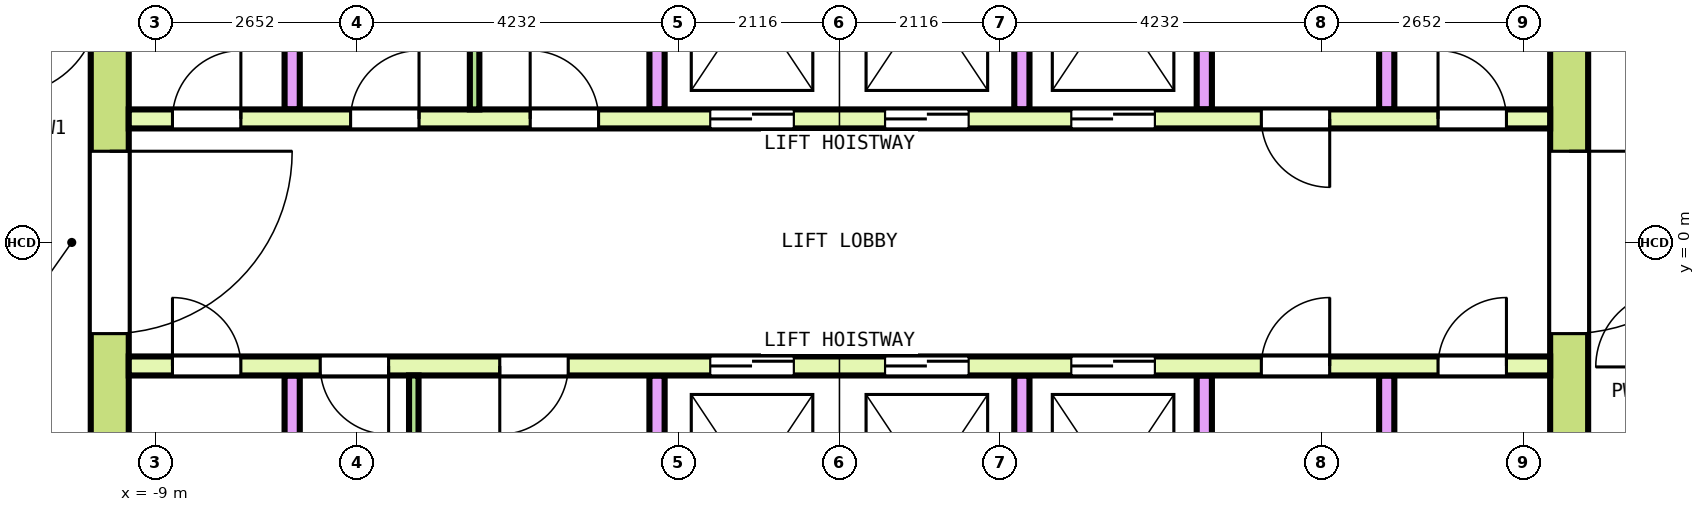
"""IFC4 building model, lengths in metres.
Left out: names, types, materials, properties, quantities, classifications, styles, units other than length and angle.
Written with IfcOpenShell. Run it as: python <this file> out.ifc"""

import sys

from ifc_helpers import new_model, si_unit, direction, frame, frame_2d, origin, place, context, subcontext, project, spatial, rectangle, extrude, element, fill, save


model = new_model("IFC4")
c1 = context("Model", 3, precision=1e-05, world=origin(), true_north=direction((0.0, 1.0)))
c2 = subcontext(c1, "Body", "Model", "MODEL_VIEW")
j1 = project(units=[si_unit("LENGTHUNIT", "METRE"), si_unit("PLANEANGLEUNIT", "RADIAN")], contexts=[c1])
p1 = place(None, origin())
s1 = spatial("IfcSite", under=j1, at=p1, CompositionType="ELEMENT")
p2 = place(p1, origin())
s2 = spatial("IfcBuilding", under=s1, at=p2, CompositionType="ELEMENT")
p3 = place(p2, frame((0.0, 0.0, 271.0)))
s3 = spatial("IfcBuildingStorey", under=s2, at=p3, CompositionType="ELEMENT", Elevation=271.0)
p4 = place(p3, frame((-9.6, -7.85, 0.0), z_axis=(0.0, 0.0, 1.0), x_axis=(0.0, 1.0, 0.0)))
e1 = element("IfcWall", 1, at=p4, inside=s3, PredefinedType="SHEAR", context=c2, shape_type="SweptSolid", body=[
    extrude(rectangle(XDim=15.7, YDim=0.5, at=frame_2d((7.85, 0.0))), origin(), (0.0, 0.0, 1.0), 3.7),
])
p5 = place(p4, frame((6.65, 0.0, 0.0)))
e2 = element("IfcOpeningElement", 2, at=p5, cuts=e1, PredefinedType="OPENING", context=c2, shape_type="SweptSolid", body=[
    extrude(rectangle(XDim=2.4, YDim=2.1, at=frame_2d((1.2, 1.05))), frame((0.0, 0.26, 0.0), z_axis=(0.0, -1.0, 0.0), x_axis=(1.0, 0.0, 0.0)), (0.0, 0.0, 1.0), 0.52),
])
p6 = place(p4, frame((13.55, 0.0, 0.0)))
e3 = element("IfcOpeningElement", 3, at=p6, cuts=e1, PredefinedType="OPENING", context=c2, shape_type="SweptSolid", body=[
    extrude(rectangle(XDim=1.2, YDim=2.1, at=frame_2d((0.6, 1.05))), frame((0.0, 0.26, 0.0), z_axis=(0.0, -1.0, 0.0), x_axis=(1.0, 0.0, 0.0)), (0.0, 0.0, 1.0), 0.52),
])
p7 = place(p4, frame((0.95, 0.0, 0.0)))
e4 = element("IfcOpeningElement", 4, at=p7, cuts=e1, PredefinedType="OPENING", context=c2, shape_type="SweptSolid", body=[
    extrude(rectangle(XDim=1.2, YDim=2.1, at=frame_2d((0.6, 1.05))), frame((0.0, 0.26, 0.0), z_axis=(0.0, -1.0, 0.0), x_axis=(1.0, 0.0, 0.0)), (0.0, 0.0, 1.0), 0.52),
])
p8 = place(p3, frame((9.6, -7.85, 0.0), z_axis=(0.0, 0.0, 1.0), x_axis=(0.0, 1.0, 0.0)))
e5 = element("IfcWall", 5, at=p8, inside=s3, PredefinedType="SHEAR", context=c2, shape_type="SweptSolid", body=[
    extrude(rectangle(XDim=15.7, YDim=0.5, at=frame_2d((7.85, 0.0))), origin(), (0.0, 0.0, 1.0), 3.7),
])
p9 = place(p8, frame((6.65, 0.0, 0.0)))
e6 = element("IfcOpeningElement", 6, at=p9, cuts=e5, PredefinedType="OPENING", context=c2, shape_type="SweptSolid", body=[
    extrude(rectangle(XDim=2.4, YDim=2.1, at=frame_2d((1.2, 1.05))), frame((0.0, 0.26, 0.0), z_axis=(0.0, -1.0, 0.0), x_axis=(1.0, 0.0, 0.0)), (0.0, 0.0, 1.0), 0.52),
])
p10 = place(p8, frame((13.55, 0.0, 0.0)))
e7 = element("IfcOpeningElement", 7, at=p10, cuts=e5, PredefinedType="OPENING", context=c2, shape_type="SweptSolid", body=[
    extrude(rectangle(XDim=1.2, YDim=2.1, at=frame_2d((0.6, 1.05))), frame((0.0, 0.26, 0.0), z_axis=(0.0, -1.0, 0.0), x_axis=(1.0, 0.0, 0.0)), (0.0, 0.0, 1.0), 0.52),
])
p11 = place(p8, frame((1.05, 0.0, 0.0)))
e8 = element("IfcOpeningElement", 8, at=p11, cuts=e5, PredefinedType="OPENING", context=c2, shape_type="SweptSolid", body=[
    extrude(rectangle(XDim=1.0, YDim=2.1, at=frame_2d((0.5, 1.05))), frame((0.0, 0.26, 0.0), z_axis=(0.0, -1.0, 0.0), x_axis=(1.0, 0.0, 0.0)), (0.0, 0.0, 1.0), 0.52),
])
p12 = place(p3, frame((-9.35, 1.625, 0.0), z_axis=(0.0, 0.0, 1.0), x_axis=(1.0, 0.0, 0.0)))
e9 = element("IfcWall", 9, at=p12, inside=s3, PredefinedType="SOLIDWALL", context=c2, shape_type="SweptSolid", body=[
    extrude(rectangle(XDim=18.7, YDim=0.25, at=frame_2d((9.35, 0.0))), origin(), (0.0, 0.0, 1.0), 3.7),
])
p13 = place(p12, frame((7.65, 0.0, 0.0)))
e10 = element("IfcOpeningElement", 10, at=p13, cuts=e9, PredefinedType="OPENING", context=c2, shape_type="SweptSolid", body=[
    extrude(rectangle(XDim=1.1, YDim=2.1, at=frame_2d((0.55, 1.05))), frame((0.0, 0.135, 0.0), z_axis=(0.0, -1.0, 0.0), x_axis=(1.0, 0.0, 0.0)), (0.0, 0.0, 1.0), 0.27),
])
p14 = place(p12, frame((9.95, 0.0, 0.0)))
e11 = element("IfcOpeningElement", 11, at=p14, cuts=e9, PredefinedType="OPENING", context=c2, shape_type="SweptSolid", body=[
    extrude(rectangle(XDim=1.1, YDim=2.1, at=frame_2d((0.55, 1.05))), frame((0.0, 0.135, 0.0), z_axis=(0.0, -1.0, 0.0), x_axis=(1.0, 0.0, 0.0)), (0.0, 0.0, 1.0), 0.27),
])
p15 = place(p12, frame((12.4, 0.0, 0.0)))
e12 = element("IfcOpeningElement", 12, at=p15, cuts=e9, PredefinedType="OPENING", context=c2, shape_type="SweptSolid", body=[
    extrude(rectangle(XDim=1.1, YDim=2.1, at=frame_2d((0.55, 1.05))), frame((0.0, 0.135, 0.0), z_axis=(0.0, -1.0, 0.0), x_axis=(1.0, 0.0, 0.0)), (0.0, 0.0, 1.0), 0.27),
])
p16 = place(p12, frame((0.575, 0.0, 0.0)))
e13 = element("IfcOpeningElement", 13, at=p16, cuts=e9, PredefinedType="OPENING", context=c2, shape_type="SweptSolid", body=[
    extrude(rectangle(XDim=0.9, YDim=2.1, at=frame_2d((0.45, 1.05))), frame((0.0, 0.135, 0.0), z_axis=(0.0, -1.0, 0.0), x_axis=(1.0, 0.0, 0.0)), (0.0, 0.0, 1.0), 0.27),
])
p17 = place(p12, frame((2.919, 0.0, 0.0)))
e14 = element("IfcOpeningElement", 14, at=p17, cuts=e9, PredefinedType="OPENING", context=c2, shape_type="SweptSolid", body=[
    extrude(rectangle(XDim=0.9, YDim=2.1, at=frame_2d((0.45, 1.05))), frame((0.0, 0.135, 0.0), z_axis=(0.0, -1.0, 0.0), x_axis=(1.0, 0.0, 0.0)), (0.0, 0.0, 1.0), 0.27),
])
p18 = place(p12, frame((5.281, 0.0, 0.0)))
e15 = element("IfcOpeningElement", 15, at=p18, cuts=e9, PredefinedType="OPENING", context=c2, shape_type="SweptSolid", body=[
    extrude(rectangle(XDim=0.9, YDim=2.1, at=frame_2d((0.45, 1.05))), frame((0.0, 0.135, 0.0), z_axis=(0.0, -1.0, 0.0), x_axis=(1.0, 0.0, 0.0)), (0.0, 0.0, 1.0), 0.27),
])
p19 = place(p12, frame((14.9, 0.0, 0.0)))
e16 = element("IfcOpeningElement", 16, at=p19, cuts=e9, PredefinedType="OPENING", context=c2, shape_type="SweptSolid", body=[
    extrude(rectangle(XDim=0.9, YDim=2.1, at=frame_2d((0.45, 1.05))), frame((0.0, 0.135, 0.0), z_axis=(0.0, -1.0, 0.0), x_axis=(1.0, 0.0, 0.0)), (0.0, 0.0, 1.0), 0.27),
])
p20 = place(p12, frame((17.225, 0.0, 0.0)))
e17 = element("IfcOpeningElement", 17, at=p20, cuts=e9, PredefinedType="OPENING", context=c2, shape_type="SweptSolid", body=[
    extrude(rectangle(XDim=0.9, YDim=2.1, at=frame_2d((0.45, 1.05))), frame((0.0, 0.135, 0.0), z_axis=(0.0, -1.0, 0.0), x_axis=(1.0, 0.0, 0.0)), (0.0, 0.0, 1.0), 0.27),
])
for number, where, z_axis, x_axis in (
    (18, (-7.2, 1.75, 0.0), (0.0, 0.0, 1.0), (0.0, 1.0, 0.0)),
    (19, (-2.4, 1.75, 0.0), (0.0, 0.0, 1.0), (0.0, 1.0, 0.0)),
    (20, (2.4, 1.75, 0.0), (0.0, 0.0, 1.0), (0.0, 1.0, 0.0)),
    (21, (4.8, 1.75, 0.0), (0.0, 0.0, 1.0), (0.0, 1.0, 0.0)),
    (22, (7.2, 1.75, 0.0), (0.0, 0.0, 1.0), (0.0, 1.0, 0.0)),
):
    element("IfcWall", number, at=place(p3, frame(where, z_axis=z_axis, x_axis=x_axis)), inside=s3, PredefinedType="SOLIDWALL", context=c2, shape_type="SweptSolid", body=[
        extrude(rectangle(XDim=2.9, YDim=0.2, at=frame_2d((1.45, 0.0))), origin(), (0.0, 0.0, 1.0), 3.7),
    ])
p21 = place(p3, frame((-9.35, -1.625, 0.0), z_axis=(0.0, 0.0, 1.0), x_axis=(1.0, 0.0, 0.0)))
e23 = element("IfcWall", 23, at=p21, inside=s3, PredefinedType="SOLIDWALL", context=c2, shape_type="SweptSolid", body=[
    extrude(rectangle(XDim=18.7, YDim=0.25, at=frame_2d((9.35, 0.0))), origin(), (0.0, 0.0, 1.0), 3.7),
])
p22 = place(p21, frame((7.65, 0.0, 0.0)))
e24 = element("IfcOpeningElement", 24, at=p22, cuts=e23, PredefinedType="OPENING", context=c2, shape_type="SweptSolid", body=[
    extrude(rectangle(XDim=1.1, YDim=2.1, at=frame_2d((0.55, 1.05))), frame((0.0, 0.135, 0.0), z_axis=(0.0, -1.0, 0.0), x_axis=(1.0, 0.0, 0.0)), (0.0, 0.0, 1.0), 0.27),
])
p23 = place(p21, frame((9.95, 0.0, 0.0)))
e25 = element("IfcOpeningElement", 25, at=p23, cuts=e23, PredefinedType="OPENING", context=c2, shape_type="SweptSolid", body=[
    extrude(rectangle(XDim=1.1, YDim=2.1, at=frame_2d((0.55, 1.05))), frame((0.0, 0.135, 0.0), z_axis=(0.0, -1.0, 0.0), x_axis=(1.0, 0.0, 0.0)), (0.0, 0.0, 1.0), 0.27),
])
p24 = place(p21, frame((12.4, 0.0, 0.0)))
e26 = element("IfcOpeningElement", 26, at=p24, cuts=e23, PredefinedType="OPENING", context=c2, shape_type="SweptSolid", body=[
    extrude(rectangle(XDim=1.1, YDim=2.1, at=frame_2d((0.55, 1.05))), frame((0.0, 0.135, 0.0), z_axis=(0.0, -1.0, 0.0), x_axis=(1.0, 0.0, 0.0)), (0.0, 0.0, 1.0), 0.27),
])
p25 = place(p21, frame((0.575, 0.0, 0.0)))
e27 = element("IfcOpeningElement", 27, at=p25, cuts=e23, PredefinedType="OPENING", context=c2, shape_type="SweptSolid", body=[
    extrude(rectangle(XDim=0.9, YDim=2.1, at=frame_2d((0.45, 1.05))), frame((0.0, 0.135, 0.0), z_axis=(0.0, -1.0, 0.0), x_axis=(1.0, 0.0, 0.0)), (0.0, 0.0, 1.0), 0.27),
])
p26 = place(p21, frame((2.519, 0.0, 0.0)))
e28 = element("IfcOpeningElement", 28, at=p26, cuts=e23, PredefinedType="OPENING", context=c2, shape_type="SweptSolid", body=[
    extrude(rectangle(XDim=0.9, YDim=2.1, at=frame_2d((0.45, 1.05))), frame((0.0, 0.135, 0.0), z_axis=(0.0, -1.0, 0.0), x_axis=(1.0, 0.0, 0.0)), (0.0, 0.0, 1.0), 0.27),
])
p27 = place(p21, frame((4.881, 0.0, 0.0)))
e29 = element("IfcOpeningElement", 29, at=p27, cuts=e23, PredefinedType="OPENING", context=c2, shape_type="SweptSolid", body=[
    extrude(rectangle(XDim=0.9, YDim=2.1, at=frame_2d((0.45, 1.05))), frame((0.0, 0.135, 0.0), z_axis=(0.0, -1.0, 0.0), x_axis=(1.0, 0.0, 0.0)), (0.0, 0.0, 1.0), 0.27),
])
p28 = place(p21, frame((14.9, 0.0, 0.0)))
e30 = element("IfcOpeningElement", 30, at=p28, cuts=e23, PredefinedType="OPENING", context=c2, shape_type="SweptSolid", body=[
    extrude(rectangle(XDim=0.9, YDim=2.1, at=frame_2d((0.45, 1.05))), frame((0.0, 0.135, 0.0), z_axis=(0.0, -1.0, 0.0), x_axis=(1.0, 0.0, 0.0)), (0.0, 0.0, 1.0), 0.27),
])
p29 = place(p21, frame((17.225, 0.0, 0.0)))
e31 = element("IfcOpeningElement", 31, at=p29, cuts=e23, PredefinedType="OPENING", context=c2, shape_type="SweptSolid", body=[
    extrude(rectangle(XDim=0.9, YDim=2.1, at=frame_2d((0.45, 1.05))), frame((0.0, 0.135, 0.0), z_axis=(0.0, -1.0, 0.0), x_axis=(1.0, 0.0, 0.0)), (0.0, 0.0, 1.0), 0.27),
])
for number, where, z_axis, x_axis in (
    (32, (-7.2, -4.65, 0.0), (0.0, 0.0, 1.0), (0.0, 1.0, 0.0)),
    (33, (-2.4, -4.65, 0.0), (0.0, 0.0, 1.0), (0.0, 1.0, 0.0)),
    (34, (2.4, -4.65, 0.0), (0.0, 0.0, 1.0), (0.0, 1.0, 0.0)),
    (35, (4.8, -4.65, 0.0), (0.0, 0.0, 1.0), (0.0, 1.0, 0.0)),
    (36, (7.2, -4.65, 0.0), (0.0, 0.0, 1.0), (0.0, 1.0, 0.0)),
):
    element("IfcWall", number, at=place(p3, frame(where, z_axis=z_axis, x_axis=x_axis)), inside=s3, PredefinedType="SOLIDWALL", context=c2, shape_type="SweptSolid", body=[
        extrude(rectangle(XDim=2.9, YDim=0.2, at=frame_2d((1.45, 0.0))), origin(), (0.0, 0.0, 1.0), 3.7),
    ])
for number, where, z_axis, x_axis in (
    (37, (-4.8, 1.75, 0.0), (0.0, 0.0, 1.0), (0.0, 1.0, 0.0)),
    (38, (-5.6, -4.65, 0.0), (0.0, 0.0, 1.0), (0.0, 1.0, 0.0)),
):
    element("IfcWall", number, at=place(p3, frame(where, z_axis=z_axis, x_axis=x_axis)), inside=s3, PredefinedType="PARTITIONING", context=c2, shape_type="SweptSolid", body=[
        extrude(rectangle(XDim=2.9, YDim=0.125, at=frame_2d((1.45, 0.0))), origin(), (0.0, 0.0, 1.0), 3.7),
    ])
p30 = place(p13, origin())
e39 = element("IfcDoor", 39, at=p30, inside=s3, OperationType="DOUBLE_DOOR_SLIDING", PredefinedType="DOOR", context=c2, shape_type="SweptSolid", body=[
    extrude(rectangle(XDim=1.1, YDim=2.1, at=frame_2d((0.55, 1.05))), frame((0.0, 0.075, 0.0), z_axis=(0.0, -1.0, 0.0), x_axis=(1.0, 0.0, 0.0)), (0.0, 0.0, 1.0), 0.15),
])
fill(e10, e39)
p31 = place(p14, origin())
e40 = element("IfcDoor", 40, at=p31, inside=s3, OperationType="DOUBLE_DOOR_SLIDING", PredefinedType="DOOR", context=c2, shape_type="SweptSolid", body=[
    extrude(rectangle(XDim=1.1, YDim=2.1, at=frame_2d((0.55, 1.05))), frame((0.0, 0.075, 0.0), z_axis=(0.0, -1.0, 0.0), x_axis=(1.0, 0.0, 0.0)), (0.0, 0.0, 1.0), 0.15),
])
fill(e11, e40)
p32 = place(p15, origin())
e41 = element("IfcDoor", 41, at=p32, inside=s3, OperationType="DOUBLE_DOOR_SLIDING", PredefinedType="DOOR", context=c2, shape_type="SweptSolid", body=[
    extrude(rectangle(XDim=1.1, YDim=2.1, at=frame_2d((0.55, 1.05))), frame((0.0, 0.075, 0.0), z_axis=(0.0, -1.0, 0.0), x_axis=(1.0, 0.0, 0.0)), (0.0, 0.0, 1.0), 0.15),
])
fill(e12, e41)
p33 = place(p22, origin())
e42 = element("IfcDoor", 42, at=p33, inside=s3, OperationType="DOUBLE_DOOR_SLIDING", PredefinedType="DOOR", context=c2, shape_type="SweptSolid", body=[
    extrude(rectangle(XDim=1.1, YDim=2.1, at=frame_2d((0.55, 1.05))), frame((0.0, 0.075, 0.0), z_axis=(0.0, -1.0, 0.0), x_axis=(1.0, 0.0, 0.0)), (0.0, 0.0, 1.0), 0.15),
])
fill(e24, e42)
p34 = place(p23, origin())
e43 = element("IfcDoor", 43, at=p34, inside=s3, OperationType="DOUBLE_DOOR_SLIDING", PredefinedType="DOOR", context=c2, shape_type="SweptSolid", body=[
    extrude(rectangle(XDim=1.1, YDim=2.1, at=frame_2d((0.55, 1.05))), frame((0.0, 0.075, 0.0), z_axis=(0.0, -1.0, 0.0), x_axis=(1.0, 0.0, 0.0)), (0.0, 0.0, 1.0), 0.15),
])
fill(e25, e43)
p35 = place(p24, origin())
e44 = element("IfcDoor", 44, at=p35, inside=s3, OperationType="DOUBLE_DOOR_SLIDING", PredefinedType="DOOR", context=c2, shape_type="SweptSolid", body=[
    extrude(rectangle(XDim=1.1, YDim=2.1, at=frame_2d((0.55, 1.05))), frame((0.0, 0.075, 0.0), z_axis=(0.0, -1.0, 0.0), x_axis=(1.0, 0.0, 0.0)), (0.0, 0.0, 1.0), 0.15),
])
fill(e26, e44)
p36 = place(p5, origin())
e45 = element("IfcDoor", 45, at=p36, inside=s3, OperationType="DOUBLE_DOOR_SINGLE_SWING", PredefinedType="DOOR", context=c2, shape_type="SweptSolid", body=[
    extrude(rectangle(XDim=2.4, YDim=2.1, at=frame_2d((1.2, 1.05))), frame((0.0, 0.2, 0.0), z_axis=(0.0, -1.0, 0.0), x_axis=(1.0, 0.0, 0.0)), (0.0, 0.0, 1.0), 0.4),
])
fill(e2, e45)
p37 = place(p9, origin())
e46 = element("IfcDoor", 46, at=p37, inside=s3, OperationType="DOUBLE_DOOR_SINGLE_SWING", PredefinedType="DOOR", context=c2, shape_type="SweptSolid", body=[
    extrude(rectangle(XDim=2.4, YDim=2.1, at=frame_2d((1.2, 1.05))), frame((0.0, 0.2, 0.0), z_axis=(0.0, -1.0, 0.0), x_axis=(1.0, 0.0, 0.0)), (0.0, 0.0, 1.0), 0.4),
])
fill(e6, e46)
p38 = place(p16, origin())
e47 = element("IfcDoor", 47, at=p38, inside=s3, OperationType="SINGLE_SWING_RIGHT", PredefinedType="DOOR", context=c2, shape_type="SweptSolid", body=[
    extrude(rectangle(XDim=0.9, YDim=2.1, at=frame_2d((0.45, 1.05))), frame((0.0, 0.075, 0.0), z_axis=(0.0, -1.0, 0.0), x_axis=(1.0, 0.0, 0.0)), (0.0, 0.0, 1.0), 0.15),
])
fill(e13, e47)
p39 = place(p17, origin())
e48 = element("IfcDoor", 48, at=p39, inside=s3, OperationType="SINGLE_SWING_LEFT", PredefinedType="DOOR", context=c2, shape_type="SweptSolid", body=[
    extrude(rectangle(XDim=0.9, YDim=2.1, at=frame_2d((0.45, 1.05))), frame((0.0, 0.075, 0.0), z_axis=(0.0, -1.0, 0.0), x_axis=(1.0, 0.0, 0.0)), (0.0, 0.0, 1.0), 0.15),
])
fill(e14, e48)
p40 = place(p18, origin())
e49 = element("IfcDoor", 49, at=p40, inside=s3, OperationType="SINGLE_SWING_RIGHT", PredefinedType="DOOR", context=c2, shape_type="SweptSolid", body=[
    extrude(rectangle(XDim=0.9, YDim=2.1, at=frame_2d((0.45, 1.05))), frame((0.0, 0.075, 0.0), z_axis=(0.0, -1.0, 0.0), x_axis=(1.0, 0.0, 0.0)), (0.0, 0.0, 1.0), 0.15),
])
fill(e15, e49)
p41 = place(p19, origin())
e50 = element("IfcDoor", 50, at=p41, inside=s3, OperationType="SINGLE_SWING_LEFT", PredefinedType="DOOR", context=c2, shape_type="SweptSolid", body=[
    extrude(rectangle(XDim=0.9, YDim=2.1, at=frame_2d((0.45, 1.05))), frame((0.0, 0.075, 0.0), z_axis=(0.0, -1.0, 0.0), x_axis=(1.0, 0.0, 0.0)), (0.0, 0.0, 1.0), 0.15),
])
fill(e16, e50)
p42 = place(p20, origin())
e51 = element("IfcDoor", 51, at=p42, inside=s3, OperationType="SINGLE_SWING_RIGHT", PredefinedType="DOOR", context=c2, shape_type="SweptSolid", body=[
    extrude(rectangle(XDim=0.9, YDim=2.1, at=frame_2d((0.45, 1.05))), frame((0.0, 0.075, 0.0), z_axis=(0.0, -1.0, 0.0), x_axis=(1.0, 0.0, 0.0)), (0.0, 0.0, 1.0), 0.15),
])
fill(e17, e51)
p43 = place(p25, origin())
e52 = element("IfcDoor", 52, at=p43, inside=s3, OperationType="SINGLE_SWING_LEFT", PredefinedType="DOOR", context=c2, shape_type="SweptSolid", body=[
    extrude(rectangle(XDim=0.9, YDim=2.1, at=frame_2d((0.45, 1.05))), frame((0.0, 0.075, 0.0), z_axis=(0.0, -1.0, 0.0), x_axis=(1.0, 0.0, 0.0)), (0.0, 0.0, 1.0), 0.15),
])
fill(e27, e52)
p44 = place(p26, origin())
e53 = element("IfcDoor", 53, at=p44, inside=s3, OperationType="SINGLE_SWING_RIGHT", PredefinedType="DOOR", context=c2, shape_type="SweptSolid", body=[
    extrude(rectangle(XDim=0.9, YDim=2.1, at=frame_2d((0.45, 1.05))), frame((0.0, 0.075, 0.0), z_axis=(0.0, -1.0, 0.0), x_axis=(1.0, 0.0, 0.0)), (0.0, 0.0, 1.0), 0.15),
])
fill(e28, e53)
p45 = place(p27, origin())
e54 = element("IfcDoor", 54, at=p45, inside=s3, OperationType="SINGLE_SWING_LEFT", PredefinedType="DOOR", context=c2, shape_type="SweptSolid", body=[
    extrude(rectangle(XDim=0.9, YDim=2.1, at=frame_2d((0.45, 1.05))), frame((0.0, 0.075, 0.0), z_axis=(0.0, -1.0, 0.0), x_axis=(1.0, 0.0, 0.0)), (0.0, 0.0, 1.0), 0.15),
])
fill(e29, e54)
p46 = place(p28, origin())
e55 = element("IfcDoor", 55, at=p46, inside=s3, OperationType="SINGLE_SWING_RIGHT", PredefinedType="DOOR", context=c2, shape_type="SweptSolid", body=[
    extrude(rectangle(XDim=0.9, YDim=2.1, at=frame_2d((0.45, 1.05))), frame((0.0, 0.075, 0.0), z_axis=(0.0, -1.0, 0.0), x_axis=(1.0, 0.0, 0.0)), (0.0, 0.0, 1.0), 0.15),
])
fill(e30, e55)
p47 = place(p29, origin())
e56 = element("IfcDoor", 56, at=p47, inside=s3, OperationType="SINGLE_SWING_LEFT", PredefinedType="DOOR", context=c2, shape_type="SweptSolid", body=[
    extrude(rectangle(XDim=0.9, YDim=2.1, at=frame_2d((0.45, 1.05))), frame((0.0, 0.075, 0.0), z_axis=(0.0, -1.0, 0.0), x_axis=(1.0, 0.0, 0.0)), (0.0, 0.0, 1.0), 0.15),
])
fill(e31, e56)
save(model, sys.argv[1])
